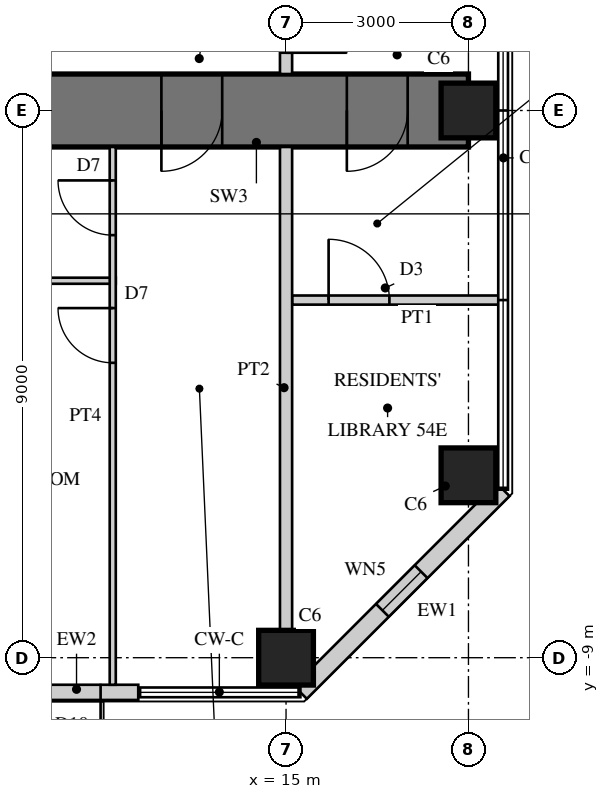
"""IFC4 building model, lengths in metres.
Left out: names, types, materials, properties, quantities, classifications, styles, units other than length and angle.
Written with IfcOpenShell. Run it as: python <this file> out.ifc"""

import sys

from ifc_helpers import new_model, si_unit, direction, frame, frame_2d, origin, origin_2d, place, context, subcontext, project, spatial, rectangle, hollow_rectangle, extrude, element, fill, save


model = new_model("IFC4")
c1 = context("Model", 3, precision=1e-05, world=origin(), true_north=direction((0.0, 1.0)))
c2 = subcontext(c1, "Body", "Model", "MODEL_VIEW")
j1 = project(units=[si_unit("LENGTHUNIT", "METRE"), si_unit("PLANEANGLEUNIT", "RADIAN")], contexts=[c1])
p1 = place(None, origin())
s1 = spatial("IfcSite", under=j1, at=p1, CompositionType="ELEMENT")
p2 = place(p1, origin())
s2 = spatial("IfcBuilding", under=s1, at=p2, CompositionType="ELEMENT")
p3 = place(p2, frame((0.0, 0.0, 213.7)))
s3 = spatial("IfcBuildingStorey", under=s2, at=p3, CompositionType="ELEMENT", Elevation=213.7)
p4 = place(p3, frame((9.0, 0.0, 0.0), z_axis=(0.0, 0.0, 1.0), x_axis=(1.0, 0.0, 0.0)))
e1 = element("IfcWall", 1, at=p4, inside=s3, PredefinedType="SHEAR", context=c2, shape_type="SweptSolid", body=[
    extrude(rectangle(XDim=9.0, YDim=1.2, at=frame_2d((4.5, 0.0))), origin(), (0.0, 0.0, 1.0), 3.4),
])
p5 = place(p4, frame((3.95, 0.0, 0.0)))
e2 = element("IfcOpeningElement", 2, at=p5, cuts=e1, PredefinedType="OPENING", context=c2, shape_type="SweptSolid", body=[
    extrude(rectangle(XDim=1.0, YDim=2.15, at=frame_2d((0.5, 1.075))), frame((0.0, 0.61, 0.0), z_axis=(0.0, -1.0, 0.0), x_axis=(1.0, 0.0, 0.0)), (0.0, 0.0, 1.0), 1.22),
])
p6 = place(p4, frame((7.0, 0.0, 0.0)))
e3 = element("IfcOpeningElement", 3, at=p6, cuts=e1, PredefinedType="OPENING", context=c2, shape_type="SweptSolid", body=[
    extrude(rectangle(XDim=1.0, YDim=2.2, at=frame_2d((0.5, 1.1))), frame((0.0, 0.61, 0.0), z_axis=(0.0, -1.0, 0.0), x_axis=(1.0, 0.0, 0.0)), (0.0, 0.0, 1.0), 1.22),
])
for number, where, z_axis, x_axis in (
    (4, (15.0, -9.0, 0.0), (0.0, 0.0, 1.0), (1.0, 0.0, 0.0)),
    (5, (18.0, -6.0, 0.0), (0.0, 0.0, 1.0), (1.0, 0.0, 0.0)),
    (6, (18.0, 0.0, 0.0), (0.0, 0.0, 1.0), (1.0, 0.0, 0.0)),
):
    element("IfcColumn", number, at=place(p3, frame(where, z_axis=z_axis, x_axis=x_axis)), inside=s3, PredefinedType="COLUMN", context=c2, shape_type="SweptSolid", body=[
        extrude(rectangle(XDim=0.9, YDim=0.9, at=origin_2d()), origin(), (0.0, 0.0, 1.0), 3.4),
    ])
p7 = place(p3, frame((9.445, -9.57, 0.0), z_axis=(0.0, 0.0, 1.0), x_axis=(1.0, 0.0, 0.0)))
e7 = element("IfcWall", 7, at=p7, inside=s3, PredefinedType="SOLIDWALL", context=c2, shape_type="SweptSolid", body=[
    extrude(rectangle(XDim=3.125, YDim=0.25, at=frame_2d((1.562, 0.0))), origin(), (0.0, 0.0, 1.0), 3.15),
])
p8 = place(p7, frame((0.6, 0.0, 0.0)))
e8 = element("IfcOpeningElement", 8, at=p8, cuts=e7, PredefinedType="OPENING", context=c2, shape_type="SweptSolid", body=[
    extrude(rectangle(XDim=1.0, YDim=2.2, at=frame_2d((0.5, 1.1))), frame((0.0, 0.135, 0.0), z_axis=(0.0, -1.0, 0.0), x_axis=(1.0, 0.0, 0.0)), (0.0, 0.0, 1.0), 0.27),
])
p9 = place(p3, frame((15.236, -9.57, 0.0), z_axis=(0.0, 0.0, 1.0), x_axis=(0.707106781187, 0.707106781187, 0.0)))
e9 = element("IfcWall", 9, at=p9, inside=s3, PredefinedType="SOLIDWALL", context=c2, shape_type="SweptSolid", body=[
    extrude(rectangle(XDim=4.715, YDim=0.3, at=frame_2d((2.357, 0.0))), origin(), (0.0, 0.0, 1.0), 3.15),
])
p10 = place(p9, frame((1.907, 0.0, 0.3)))
e10 = element("IfcOpeningElement", 10, at=p10, cuts=e9, PredefinedType="OPENING", context=c2, shape_type="SweptSolid", body=[
    extrude(rectangle(XDim=0.9, YDim=2.4, at=frame_2d((0.45, 1.2))), frame((0.0, 0.16, 0.0), z_axis=(0.0, -1.0, 0.0), x_axis=(1.0, 0.0, 0.0)), (0.0, 0.0, 1.0), 0.32),
])
p11 = place(p3, frame((9.55, -2.8, 0.0), z_axis=(0.0, 0.0, 1.0), x_axis=(1.0, 0.0, 0.0)))
e11 = element("IfcWall", 11, at=p11, inside=s3, PredefinedType="PARTITIONING", context=c2, shape_type="SweptSolid", body=[
    extrude(rectangle(XDim=2.65, YDim=0.1, at=frame_2d((1.325, 0.0))), origin(), (0.0, 0.0, 1.0), 3.15),
])
p12 = place(p3, frame((12.15, -9.445, 0.0), z_axis=(0.0, 0.0, 1.0), x_axis=(0.0, 1.0, 0.0)))
e12 = element("IfcWall", 12, at=p12, inside=s3, PredefinedType="PARTITIONING", context=c2, shape_type="SweptSolid", body=[
    extrude(rectangle(XDim=8.845, YDim=0.1, at=frame_2d((4.422, 0.0))), origin(), (0.0, 0.0, 1.0), 3.15),
])
p13 = place(p12, frame((5.295, 0.0, 0.0)))
e13 = element("IfcOpeningElement", 13, at=p13, cuts=e12, PredefinedType="OPENING", context=c2, shape_type="SweptSolid", body=[
    extrude(rectangle(XDim=0.9, YDim=2.1, at=frame_2d((0.45, 1.05))), frame((0.0, 0.06, 0.0), z_axis=(0.0, -1.0, 0.0), x_axis=(1.0, 0.0, 0.0)), (0.0, 0.0, 1.0), 0.12),
])
p14 = place(p12, frame((7.395, 0.0, 0.0)))
e14 = element("IfcOpeningElement", 14, at=p14, cuts=e12, PredefinedType="OPENING", context=c2, shape_type="SweptSolid", body=[
    extrude(rectangle(XDim=0.9, YDim=2.1, at=frame_2d((0.45, 1.05))), frame((0.0, 0.06, 0.0), z_axis=(0.0, -1.0, 0.0), x_axis=(1.0, 0.0, 0.0)), (0.0, 0.0, 1.0), 0.12),
])
p15 = place(p3, frame((15.1, -3.118, 0.0), z_axis=(0.0, 0.0, 1.0), x_axis=(1.0, 0.0, 0.0)))
e15 = element("IfcWall", 15, at=p15, inside=s3, PredefinedType="PARTITIONING", context=c2, shape_type="SweptSolid", body=[
    extrude(rectangle(XDim=3.43, YDim=0.15, at=frame_2d((1.715, 0.0))), origin(), (0.0, 0.0, 1.0), 3.15),
])
p16 = place(p15, frame((0.6, 0.0, 0.0)))
e16 = element("IfcOpeningElement", 16, at=p16, cuts=e15, PredefinedType="OPENING", context=c2, shape_type="SweptSolid", body=[
    extrude(rectangle(XDim=1.0, YDim=2.1, at=frame_2d((0.5, 1.05))), frame((0.0, 0.085, 0.0), z_axis=(0.0, -1.0, 0.0), x_axis=(1.0, 0.0, 0.0)), (0.0, 0.0, 1.0), 0.17),
])
p17 = place(p3, frame((15.0, -8.55, 0.0), z_axis=(0.0, 0.0, 1.0), x_axis=(0.0, 1.0, 0.0)))
e17 = element("IfcWall", 17, at=p17, inside=s3, PredefinedType="SOLIDWALL", context=c2, shape_type="SweptSolid", body=[
    extrude(rectangle(XDim=7.95, YDim=0.2, at=frame_2d((3.975, 0.0))), origin(), (0.0, 0.0, 1.0), 2.1),
])
p18 = place(p3, frame((15.0, 0.6, 0.0), z_axis=(0.0, 0.0, 1.0), x_axis=(0.0, 1.0, 0.0)))
e18 = element("IfcWall", 18, at=p18, inside=s3, PredefinedType="SOLIDWALL", context=c2, shape_type="SweptSolid", body=[
    extrude(rectangle(XDim=7.95, YDim=0.2, at=frame_2d((3.975, 0.0))), origin(), (0.0, 0.0, 1.0), 2.1),
])
p19 = place(p18, frame((0.35, 0.0, 0.0)))
e19 = element("IfcOpeningElement", 19, at=p19, cuts=e18, PredefinedType="OPENING", context=c2, shape_type="SweptSolid", body=[
    extrude(rectangle(XDim=1.0, YDim=2.0, at=frame_2d((0.5, 1.0))), frame((0.0, 0.11, 0.0), z_axis=(0.0, -1.0, 0.0), x_axis=(1.0, 0.0, 0.0)), (0.0, 0.0, 1.0), 0.22),
])
p20 = place(p10, origin())
e20 = element("IfcWindow", 20, at=p20, inside=s3, PartitioningType="SINGLE_PANEL", PredefinedType="WINDOW", context=c2, shape_type="SweptSolid", body=[
    extrude(hollow_rectangle(XDim=0.9, YDim=2.4, WallThickness=0.06, at=frame_2d((0.45, 1.2))), frame((0.0, 0.03, 0.0), z_axis=(0.0, -1.0, 0.0), x_axis=(1.0, 0.0, 0.0)), (0.0, 0.0, 1.0), 0.06),
    extrude(rectangle(XDim=0.779, YDim=2.279, at=frame_2d((0.45, 1.2))), frame((0.0, 0.03, 0.0), z_axis=(0.0, -1.0, 0.0), x_axis=(1.0, 0.0, 0.0)), (0.0, 0.0, 1.0), 0.06),
])
fill(e10, e20)
p21 = place(p13, origin())
e21 = element("IfcDoor", 21, at=p21, inside=s3, OperationType="SINGLE_SWING_RIGHT", PredefinedType="DOOR", context=c2, shape_type="SweptSolid", body=[
    extrude(rectangle(XDim=0.9, YDim=2.1, at=frame_2d((0.45, 1.05))), frame((0.0, 0.025, 0.0), z_axis=(0.0, -1.0, 0.0), x_axis=(1.0, 0.0, 0.0)), (0.0, 0.0, 1.0), 0.05),
])
fill(e13, e21)
p22 = place(p14, origin())
e22 = element("IfcDoor", 22, at=p22, inside=s3, OperationType="SINGLE_SWING_RIGHT", PredefinedType="DOOR", context=c2, shape_type="SweptSolid", body=[
    extrude(rectangle(XDim=0.9, YDim=2.1, at=frame_2d((0.45, 1.05))), frame((0.0, 0.025, 0.0), z_axis=(0.0, -1.0, 0.0), x_axis=(1.0, 0.0, 0.0)), (0.0, 0.0, 1.0), 0.05),
])
fill(e14, e22)
p23 = place(p16, origin())
e23 = element("IfcDoor", 23, at=p23, inside=s3, OperationType="SINGLE_SWING_LEFT", PredefinedType="DOOR", context=c2, shape_type="SweptSolid", body=[
    extrude(rectangle(XDim=1.0, YDim=2.1, at=frame_2d((0.5, 1.05))), frame((0.0, 0.025, 0.0), z_axis=(0.0, -1.0, 0.0), x_axis=(1.0, 0.0, 0.0)), (0.0, 0.0, 1.0), 0.05),
])
fill(e16, e23)
p24 = place(p19, frame((1.0, 0.0, 0.0), z_axis=(0.0, 0.0, 1.0), x_axis=(-1.0, 0.0, 0.0)))
e24 = element("IfcDoor", 24, at=p24, inside=s3, OperationType="SINGLE_SWING_RIGHT", PredefinedType="DOOR", context=c2, shape_type="SweptSolid", body=[
    extrude(rectangle(XDim=1.0, YDim=2.0, at=frame_2d((0.5, 1.0))), frame((0.0, 0.025, 0.0), z_axis=(0.0, -1.0, 0.0), x_axis=(1.0, 0.0, 0.0)), (0.0, 0.0, 1.0), 0.05),
])
fill(e19, e24)
p25 = place(p5, frame((1.0, 0.0, 0.0), z_axis=(0.0, 0.0, 1.0), x_axis=(-1.0, 0.0, 0.0)))
e25 = element("IfcDoor", 25, at=p25, inside=s3, OperationType="SINGLE_SWING_RIGHT", PredefinedType="DOOR", context=c2, shape_type="SweptSolid", body=[
    extrude(rectangle(XDim=1.0, YDim=2.15, at=frame_2d((0.5, 1.075))), frame((0.0, 0.025, 0.0), z_axis=(0.0, -1.0, 0.0), x_axis=(1.0, 0.0, 0.0)), (0.0, 0.0, 1.0), 0.05),
])
fill(e2, e25)
p26 = place(p6, frame((1.0, 0.0, 0.0), z_axis=(0.0, 0.0, 1.0), x_axis=(-1.0, 0.0, 0.0)))
e26 = element("IfcDoor", 26, at=p26, inside=s3, OperationType="SINGLE_SWING_RIGHT", PredefinedType="DOOR", context=c2, shape_type="SweptSolid", body=[
    extrude(rectangle(XDim=1.0, YDim=2.2, at=frame_2d((0.5, 1.1))), frame((0.0, 0.025, 0.0), z_axis=(0.0, -1.0, 0.0), x_axis=(1.0, 0.0, 0.0)), (0.0, 0.0, 1.0), 0.05),
])
fill(e3, e26)
save(model, sys.argv[1])
